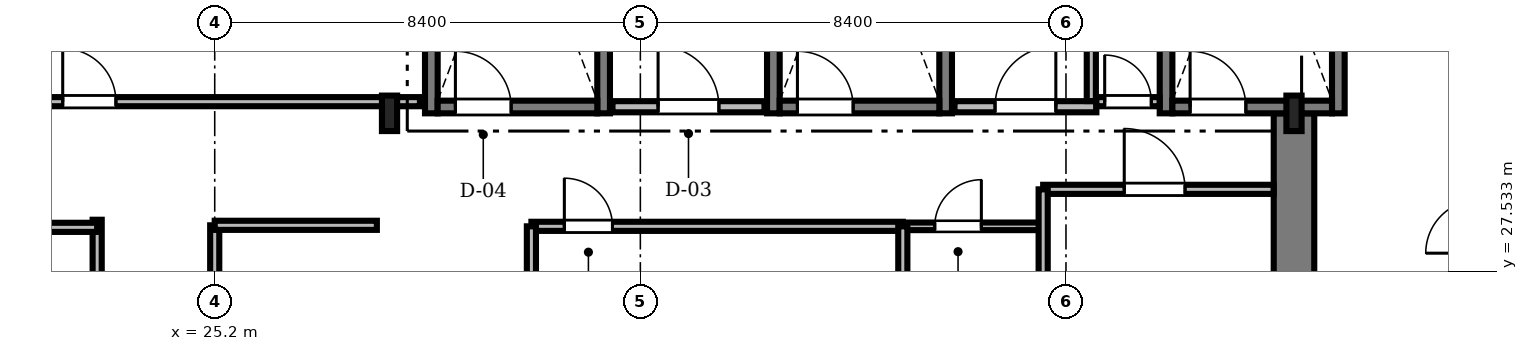
"""IFC4 building model, lengths in metres.
Left out: names, types, materials, properties, quantities, classifications, styles, units other than length and angle.
Written with IfcOpenShell. Run it as: python <this file> out.ifc"""

import sys

from ifc_helpers import new_model, si_unit, direction, frame, frame_2d, origin, origin_2d, place, context, subcontext, project, spatial, rectangle, i_section, extrude, source, transform, mapped, element, fill, save


model = new_model("IFC4")
c1 = context("Model", 3, precision=1e-05, world=origin(), true_north=direction((0.0, 1.0)))
c2 = subcontext(c1, "Body", "Model", "MODEL_VIEW")
j1 = project(units=[si_unit("LENGTHUNIT", "METRE"), si_unit("PLANEANGLEUNIT", "RADIAN")], contexts=[c1])
p1 = place(None, origin())
s1 = spatial("IfcSite", under=j1, at=p1, CompositionType="ELEMENT")
p2 = place(p1, origin())
s2 = spatial("IfcBuilding", under=s1, at=p2, CompositionType="ELEMENT")
p3 = place(p2, frame((0.0, 0.0, 233.55)))
s3 = spatial("IfcBuildingStorey", under=s2, at=p3, CompositionType="ELEMENT", Elevation=233.55)
m1 = source(origin(), c2, "Body", "SweptSolid", [
    extrude(rectangle(XDim=13.15, YDim=0.8, at=frame_2d((6.575, 0.0))), origin(), (0.0, 0.0, 1.0), 3.1),
])
p4 = place(p3, frame((46.5, 17.5, 0.0), z_axis=(0.0, 0.0, 1.0), x_axis=(0.0, 1.0, 0.0)))
e1 = element("IfcWall", 1, at=p4, inside=s3, PredefinedType="SHEAR", context=c2, shape_type="MappedRepresentation", body=[
    mapped(m1, transform((0.0, 0.0, 0.0), scale=1.0)),
])
m2 = source(origin(), c2, "Body", "SweptSolid", [
    extrude(i_section(OverallWidth=0.3, OverallDepth=0.7, WebThickness=0.017, FlangeThickness=0.032, FilletRadius=0.027, at=origin_2d()), origin(), (0.0, 0.0, 1.0), 3.1),
])
for number, where, z_axis, x_axis in (
    (2, (28.65, 30.65, 0.0), (0.0, 0.0, 1.0), (1.0, 0.0, 0.0)),
    (3, (46.5, 30.65, 0.0), (0.0, 0.0, 1.0), (1.0, 0.0, 0.0)),
):
    element("IfcColumn", number, at=place(p3, frame(where, z_axis=z_axis, x_axis=x_axis)), inside=s3, PredefinedType="COLUMN", context=c2, shape_type="MappedRepresentation", body=[
        mapped(m2, transform((0.0, 0.0, 0.0), scale=1.0)),
    ])
m3 = source(origin(), c2, "Body", "SweptSolid", [
    extrude(rectangle(XDim=9.25, YDim=0.25, at=frame_2d((4.625, 0.0))), origin(), (0.0, 0.0, 1.0), 3.55),
])
for number, where, z_axis, x_axis in (
    (4, (29.475, 30.65, 0.0), (0.0, 0.0, 1.0), (0.0, 1.0, 0.0)),
    (5, (32.875, 30.65, 0.0), (0.0, 0.0, 1.0), (0.0, 1.0, 0.0)),
):
    element("IfcWall", number, at=place(p3, frame(where, z_axis=z_axis, x_axis=x_axis)), inside=s3, PredefinedType="SOLIDWALL", context=c2, shape_type="MappedRepresentation", body=[
        mapped(m3, transform((0.0, 0.0, 0.0), scale=1.0)),
    ])
m4 = source(origin(), c2, "Body", "SweptSolid", [
    extrude(rectangle(XDim=3.15, YDim=0.25, at=frame_2d((1.575, 0.0))), origin(), (0.0, 0.0, 1.0), 3.55),
])
p5 = place(p3, frame((29.6, 30.775, 0.0), z_axis=(0.0, 0.0, 1.0), x_axis=(1.0, 0.0, 0.0)))
e6 = element("IfcWall", 6, at=p5, inside=s3, PredefinedType="SOLIDWALL", context=c2, shape_type="MappedRepresentation", body=[
    mapped(m4, transform((0.0, 0.0, 0.0), scale=1.0)),
])
m5 = source(origin(), c2, "Body", "SweptSolid", [
    extrude(rectangle(XDim=1.1, YDim=2.2, at=frame_2d((0.55, 1.1))), frame((0.0, 0.135, 0.0), z_axis=(0.0, -1.0, 0.0), x_axis=(1.0, 0.0, 0.0)), (0.0, 0.0, 1.0), 0.27),
])
p6 = place(p5, frame((0.35, 0.0, 0.0)))
e7 = element("IfcOpeningElement", 7, at=p6, cuts=e6, PredefinedType="OPENING", context=c2, shape_type="MappedRepresentation", body=[
    mapped(m5, transform((0.0, 0.0, 0.0), scale=1.0)),
])
for number, where, z_axis, x_axis in (
    (8, (36.225, 30.65, 0.0), (0.0, 0.0, 1.0), (0.0, 1.0, 0.0)),
    (9, (39.625, 30.65, 0.0), (0.0, 0.0, 1.0), (0.0, 1.0, 0.0)),
):
    element("IfcWall", number, at=place(p3, frame(where, z_axis=z_axis, x_axis=x_axis)), inside=s3, PredefinedType="SOLIDWALL", context=c2, shape_type="MappedRepresentation", body=[
        mapped(m3, transform((0.0, 0.0, 0.0), scale=1.0)),
    ])
p7 = place(p3, frame((36.35, 30.775, 0.0), z_axis=(0.0, 0.0, 1.0), x_axis=(1.0, 0.0, 0.0)))
e10 = element("IfcWall", 10, at=p7, inside=s3, PredefinedType="SOLIDWALL", context=c2, shape_type="MappedRepresentation", body=[
    mapped(m4, transform((0.0, 0.0, 0.0), scale=1.0)),
])
p8 = place(p7, frame((0.35, 0.0, 0.0)))
e11 = element("IfcOpeningElement", 11, at=p8, cuts=e10, PredefinedType="OPENING", context=c2, shape_type="MappedRepresentation", body=[
    mapped(m5, transform((0.0, 0.0, 0.0), scale=1.0)),
])
for number, where, z_axis, x_axis in (
    (12, (43.975, 30.65, 0.0), (0.0, 0.0, 1.0), (0.0, 1.0, 0.0)),
    (13, (47.375, 30.65, 0.0), (0.0, 0.0, 1.0), (0.0, 1.0, 0.0)),
):
    element("IfcWall", number, at=place(p3, frame(where, z_axis=z_axis, x_axis=x_axis)), inside=s3, PredefinedType="SOLIDWALL", context=c2, shape_type="MappedRepresentation", body=[
        mapped(m3, transform((0.0, 0.0, 0.0), scale=1.0)),
    ])
p9 = place(p3, frame((44.1, 30.775, 0.0), z_axis=(0.0, 0.0, 1.0), x_axis=(1.0, 0.0, 0.0)))
e14 = element("IfcWall", 14, at=p9, inside=s3, PredefinedType="SOLIDWALL", context=c2, shape_type="MappedRepresentation", body=[
    mapped(m4, transform((0.0, 0.0, 0.0), scale=1.0)),
])
p10 = place(p9, frame((0.35, 0.0, 0.0)))
e15 = element("IfcOpeningElement", 15, at=p10, cuts=e14, PredefinedType="OPENING", context=c2, shape_type="MappedRepresentation", body=[
    mapped(m5, transform((0.0, 0.0, 0.0), scale=1.0)),
])
m6 = source(origin(), c2, "Body", "SweptSolid", [
    extrude(rectangle(XDim=3.0, YDim=0.22, at=frame_2d((1.5, 0.0))), origin(), (0.0, 0.0, 1.0), 3.1),
])
p11 = place(p3, frame((33.05, 30.78, 0.0), z_axis=(0.0, 0.0, 1.0), x_axis=(1.0, 0.0, 0.0)))
e16 = element("IfcWall", 16, at=p11, inside=s3, PredefinedType="SOLIDWALL", context=c2, shape_type="MappedRepresentation", body=[
    mapped(m6, transform((0.0, 0.0, 0.0), scale=1.0)),
])
m7 = source(origin(), c2, "Body", "SweptSolid", [
    extrude(rectangle(XDim=1.2, YDim=2.2, at=frame_2d((0.6, 1.1))), frame((0.0, 0.12, 0.0), z_axis=(0.0, -1.0, 0.0), x_axis=(1.0, 0.0, 0.0)), (0.0, 0.0, 1.0), 0.24),
])
p12 = place(p11, frame((0.9, 0.0, 0.0)))
e17 = element("IfcOpeningElement", 17, at=p12, cuts=e16, PredefinedType="OPENING", context=c2, shape_type="MappedRepresentation", body=[
    mapped(m7, transform((0.0, 0.0, 0.0), scale=1.0)),
])
m8 = source(origin(), c2, "Body", "SweptSolid", [
    extrude(rectangle(XDim=2.8, YDim=0.22, at=frame_2d((1.4, 0.0))), origin(), (0.0, 0.0, 1.0), 3.1),
])
p13 = place(p3, frame((39.8, 30.78, 0.0), z_axis=(0.0, 0.0, 1.0), x_axis=(1.0, 0.0, 0.0)))
e18 = element("IfcWall", 18, at=p13, inside=s3, PredefinedType="SOLIDWALL", context=c2, shape_type="MappedRepresentation", body=[
    mapped(m8, transform((0.0, 0.0, 0.0), scale=1.0)),
])
p14 = place(p13, frame((0.8, 0.0, 0.0)))
e19 = element("IfcOpeningElement", 19, at=p14, cuts=e18, PredefinedType="OPENING", context=c2, shape_type="MappedRepresentation", body=[
    mapped(m7, transform((0.0, 0.0, 0.0), scale=1.0)),
])
m9 = source(origin(), c2, "Body", "SweptSolid", [
    extrude(rectangle(XDim=17.828, YDim=0.18, at=frame_2d((8.914, 0.0))), origin(), (0.0, 0.0, 1.0), 2.376),
])
p15 = place(p3, frame((11.422, 30.88, 0.0), z_axis=(0.0, 0.0, 1.0), x_axis=(1.0, 0.0, 0.0)))
e20 = element("IfcWall", 20, at=p15, inside=s3, PredefinedType="PARTITIONING", context=c2, shape_type="MappedRepresentation", body=[
    mapped(m9, transform((0.0, 0.0, 0.0), scale=1.0)),
])
m10 = source(origin(), c2, "Body", "SweptSolid", [
    extrude(rectangle(XDim=1.05, YDim=2.2, at=frame_2d((0.525, 1.1))), frame((0.0, 0.1, 0.0), z_axis=(0.0, -1.0, 0.0), x_axis=(1.0, 0.0, 0.0)), (0.0, 0.0, 1.0), 0.2),
])
p16 = place(p15, frame((10.778, 0.0, 0.0)))
e21 = element("IfcOpeningElement", 21, at=p16, cuts=e20, PredefinedType="OPENING", context=c2, shape_type="MappedRepresentation", body=[
    mapped(m10, transform((0.0, 0.0, 0.0), scale=1.0)),
])
m11 = source(origin(), c2, "Body", "SweptSolid", [
    extrude(rectangle(XDim=11.94, YDim=0.18, at=frame_2d((5.97, 0.0))), origin(), (0.0, 0.0, 1.0), 2.542),
])
p17 = place(p3, frame((25.2, 16.5, 0.0), z_axis=(0.0, 0.0, 1.0), x_axis=(0.0, 1.0, 0.0)))
e22 = element("IfcWall", 22, at=p17, inside=s3, PredefinedType="PARTITIONING", context=c2, shape_type="MappedRepresentation", body=[
    mapped(m11, transform((0.0, 0.0, 0.0), scale=1.0)),
])
p18 = place(p17, frame((4.5, 0.0, 0.0)))
e23 = element("IfcOpeningElement", 23, at=p18, cuts=e22, PredefinedType="OPENING", context=c2, shape_type="MappedRepresentation", body=[
    mapped(m10, transform((0.0, 0.0, 0.0), scale=1.0)),
])
m12 = source(origin(), c2, "Body", "SweptSolid", [
    extrude(rectangle(XDim=7.33, YDim=0.18, at=frame_2d((3.665, 0.0))), origin(), (0.0, 0.0, 1.0), 2.732),
])
p19 = place(p3, frame((31.45, 28.42, 0.0), z_axis=(0.0, 0.0, 1.0), x_axis=(1.0, 0.0, 0.0)))
e24 = element("IfcWall", 24, at=p19, inside=s3, PredefinedType="PARTITIONING", context=c2, shape_type="MappedRepresentation", body=[
    mapped(m12, transform((0.0, 0.0, 0.0), scale=1.0)),
])
m13 = source(origin(), c2, "Body", "SweptSolid", [
    extrude(rectangle(XDim=0.95, YDim=2.15, at=frame_2d((0.475, 1.075))), frame((0.0, 0.1, 0.0), z_axis=(0.0, -1.0, 0.0), x_axis=(1.0, 0.0, 0.0)), (0.0, 0.0, 1.0), 0.2),
])
p20 = place(p19, frame((0.65, 0.0, 0.0)))
e25 = element("IfcOpeningElement", 25, at=p20, cuts=e24, PredefinedType="OPENING", context=c2, shape_type="MappedRepresentation", body=[
    mapped(m13, transform((0.0, 0.0, 0.0), scale=1.0)),
])
m14 = source(origin(), c2, "Body", "SweptSolid", [
    extrude(rectangle(XDim=4.548, YDim=0.18, at=frame_2d((2.274, 0.0))), origin(), (0.0, 0.0, 1.0), 2.732),
])
p21 = place(p3, frame((41.55, 29.15, 0.0), z_axis=(0.0, 0.0, 1.0), x_axis=(1.0, 0.0, 0.0)))
e26 = element("IfcWall", 26, at=p21, inside=s3, PredefinedType="PARTITIONING", context=c2, shape_type="MappedRepresentation", body=[
    mapped(m14, transform((0.0, 0.0, 0.0), scale=1.0)),
])
m15 = source(origin(), c2, "Body", "SweptSolid", [
    extrude(rectangle(XDim=1.2, YDim=2.2, at=frame_2d((0.6, 1.1))), frame((0.0, 0.1, 0.0), z_axis=(0.0, -1.0, 0.0), x_axis=(1.0, 0.0, 0.0)), (0.0, 0.0, 1.0), 0.2),
])
p22 = place(p21, frame((1.6, 0.0, 0.0)))
e27 = element("IfcOpeningElement", 27, at=p22, cuts=e26, PredefinedType="OPENING", context=c2, shape_type="MappedRepresentation", body=[
    mapped(m15, transform((0.0, 0.0, 0.0), scale=1.0)),
])
m16 = source(origin(), c2, "Body", "SweptSolid", [
    extrude(rectangle(XDim=2.74, YDim=0.15, at=frame_2d((1.37, 0.0))), origin(), (0.0, 0.0, 1.0), 3.1),
])
p23 = place(p3, frame((38.78, 28.42, 0.0), z_axis=(0.0, 0.0, 1.0), x_axis=(1.0, 0.0, 0.0)))
e28 = element("IfcWall", 28, at=p23, inside=s3, PredefinedType="PARTITIONING", context=c2, shape_type="MappedRepresentation", body=[
    mapped(m16, transform((0.0, 0.0, 0.0), scale=1.0)),
])
m17 = source(origin(), c2, "Body", "SweptSolid", [
    extrude(rectangle(XDim=0.92, YDim=2.1, at=frame_2d((0.46, 1.05))), frame((0.0, 0.085, 0.0), z_axis=(0.0, -1.0, 0.0), x_axis=(1.0, 0.0, 0.0)), (0.0, 0.0, 1.0), 0.17),
])
p24 = place(p23, frame((0.63, 0.0, 0.0)))
e29 = element("IfcOpeningElement", 29, at=p24, cuts=e28, PredefinedType="OPENING", context=c2, shape_type="MappedRepresentation", body=[
    mapped(m17, transform((0.0, 0.0, 0.0), scale=1.0)),
])
m18 = source(origin(), c2, "Body", "SweptSolid", [
    extrude(rectangle(XDim=1.248, YDim=0.18, at=frame_2d((0.624, 0.0))), origin(), (0.0, 0.0, 1.0), 3.1),
])
p25 = place(p3, frame((42.6, 30.88, 0.0), z_axis=(0.0, 0.0, 1.0), x_axis=(1.0, 0.0, 0.0)))
e30 = element("IfcWall", 30, at=p25, inside=s3, PredefinedType="PARTITIONING", context=c2, shape_type="MappedRepresentation", body=[
    mapped(m18, transform((0.0, 0.0, 0.0), scale=1.0)),
])
m19 = source(origin(), c2, "Body", "SweptSolid", [
    extrude(rectangle(XDim=0.92, YDim=2.1, at=frame_2d((0.46, 1.05))), frame((0.0, 0.1, 0.0), z_axis=(0.0, -1.0, 0.0), x_axis=(1.0, 0.0, 0.0)), (0.0, 0.0, 1.0), 0.2),
])
p26 = place(p25, frame((0.164, 0.0, 0.0)))
e31 = element("IfcOpeningElement", 31, at=p26, cuts=e30, PredefinedType="OPENING", context=c2, shape_type="MappedRepresentation", body=[
    mapped(m19, transform((0.0, 0.0, 0.0), scale=1.0)),
])
m20 = source(origin(), c2, "Body", "SweptSolid", [
    extrude(rectangle(XDim=14.98, YDim=0.18, at=frame_2d((7.49, 0.0))), origin(), (0.0, 0.0, 1.0), 2.542),
])
p27 = place(p3, frame((22.88, 13.57, 0.0), z_axis=(0.0, 0.0, 1.0), x_axis=(0.0, 1.0, 0.0)))
e32 = element("IfcWall", 32, at=p27, inside=s3, PredefinedType="PARTITIONING", context=c2, shape_type="MappedRepresentation", body=[
    mapped(m20, transform((0.0, 0.0, 0.0), scale=1.0)),
])
m21 = source(origin(), c2, "Body", "SweptSolid", [
    extrude(rectangle(XDim=11.65, YDim=0.18, at=frame_2d((5.825, 0.0))), origin(), (0.0, 0.0, 1.0), 2.376),
])
p28 = place(p3, frame((11.23, 28.4, 0.0), z_axis=(0.0, 0.0, 1.0), x_axis=(1.0, 0.0, 0.0)))
e33 = element("IfcWall", 33, at=p28, inside=s3, PredefinedType="PARTITIONING", context=c2, shape_type="MappedRepresentation", body=[
    mapped(m21, transform((0.0, 0.0, 0.0), scale=1.0)),
])
m22 = source(origin(), c2, "Body", "SweptSolid", [
    extrude(rectangle(XDim=3.2, YDim=0.18, at=frame_2d((1.6, 0.0))), origin(), (0.0, 0.0, 1.0), 3.1),
])
p29 = place(p3, frame((25.2, 28.44, 0.0), z_axis=(0.0, 0.0, 1.0), x_axis=(1.0, 0.0, 0.0)))
e34 = element("IfcWall", 34, at=p29, inside=s3, PredefinedType="PARTITIONING", context=c2, shape_type="MappedRepresentation", body=[
    mapped(m22, transform((0.0, 0.0, 0.0), scale=1.0)),
])
m23 = source(origin(), c2, "Body", "SweptSolid", [
    extrude(rectangle(XDim=2.758, YDim=0.18, at=frame_2d((1.379, 0.0))), origin(), (0.0, 0.0, 1.0), 3.1),
])
p30 = place(p3, frame((42.5, 30.892, 0.0), z_axis=(0.0, 0.0, 1.0), x_axis=(0.0, 1.0, 0.0)))
e35 = element("IfcWall", 35, at=p30, inside=s3, PredefinedType="PARTITIONING", context=c2, shape_type="MappedRepresentation", body=[
    mapped(m23, transform((0.0, 0.0, 0.0), scale=1.0)),
])
m24 = source(origin(), c2, "Body", "SweptSolid", [
    extrude(rectangle(XDim=2.35, YDim=0.18, at=frame_2d((1.175, 0.0))), origin(), (0.0, 0.0, 1.0), 2.542),
])
p31 = place(p3, frame((41.55, 26.8, 0.0), z_axis=(0.0, 0.0, 1.0), x_axis=(0.0, 1.0, 0.0)))
e36 = element("IfcWall", 36, at=p31, inside=s3, PredefinedType="PARTITIONING", context=c2, shape_type="MappedRepresentation", body=[
    mapped(m24, transform((0.0, 0.0, 0.0), scale=1.0)),
])
m25 = source(origin(), c2, "Body", "SweptSolid", [
    extrude(rectangle(XDim=1.6, YDim=0.18, at=frame_2d((0.8, 0.0))), origin(), (0.0, 0.0, 1.0), 2.642),
])
for number, where, z_axis, x_axis in (
    (37, (31.45, 26.82, 0.0), (0.0, 0.0, 1.0), (0.0, 1.0, 0.0)),
    (38, (38.78, 26.82, 0.0), (0.0, 0.0, 1.0), (0.0, 1.0, 0.0)),
):
    element("IfcWall", number, at=place(p3, frame(where, z_axis=z_axis, x_axis=x_axis)), inside=s3, PredefinedType="PARTITIONING", context=c2, shape_type="MappedRepresentation", body=[
        mapped(m25, transform((0.0, 0.0, 0.0), scale=1.0)),
    ])
m26 = source(origin(), c2, "Body", "SweptSolid", [
    extrude(rectangle(XDim=1.1, YDim=2.2, at=frame_2d((0.55, 1.1))), frame((0.0, 0.025, 0.0), z_axis=(0.0, -1.0, 0.0), x_axis=(1.0, 0.0, 0.0)), (0.0, 0.0, 1.0), 0.05),
])
p32 = place(p6, origin())
e39 = element("IfcDoor", 39, at=p32, inside=s3, OperationType="SINGLE_SWING_LEFT", PredefinedType="DOOR", context=c2, shape_type="MappedRepresentation", body=[
    mapped(m26, transform((0.0, 0.0, 0.0), scale=1.0)),
])
fill(e7, e39)
p33 = place(p8, origin())
e40 = element("IfcDoor", 40, at=p33, inside=s3, OperationType="SINGLE_SWING_LEFT", PredefinedType="DOOR", context=c2, shape_type="MappedRepresentation", body=[
    mapped(m26, transform((0.0, 0.0, 0.0), scale=1.0)),
])
fill(e11, e40)
p34 = place(p10, origin())
e41 = element("IfcDoor", 41, at=p34, inside=s3, OperationType="SINGLE_SWING_LEFT", PredefinedType="DOOR", context=c2, shape_type="MappedRepresentation", body=[
    mapped(m26, transform((0.0, 0.0, 0.0), scale=1.0)),
])
fill(e15, e41)
m27 = source(origin(), c2, "Body", "SweptSolid", [
    extrude(rectangle(XDim=1.2, YDim=2.2, at=frame_2d((0.6, 1.1))), frame((0.0, 0.025, 0.0), z_axis=(0.0, -1.0, 0.0), x_axis=(1.0, 0.0, 0.0)), (0.0, 0.0, 1.0), 0.05),
])
p35 = place(p12, origin())
e42 = element("IfcDoor", 42, at=p35, inside=s3, OperationType="SINGLE_SWING_LEFT", PredefinedType="DOOR", context=c2, shape_type="MappedRepresentation", body=[
    mapped(m27, transform((0.0, 0.0, 0.0), scale=1.0)),
])
fill(e17, e42)
p36 = place(p14, origin())
e43 = element("IfcDoor", 43, at=p36, inside=s3, OperationType="SINGLE_SWING_RIGHT", PredefinedType="DOOR", context=c2, shape_type="MappedRepresentation", body=[
    mapped(m27, transform((0.0, 0.0, 0.0), scale=1.0)),
])
fill(e19, e43)
m28 = source(origin(), c2, "Body", "SweptSolid", [
    extrude(rectangle(XDim=1.05, YDim=2.2, at=frame_2d((0.525, 1.1))), frame((0.0, 0.025, 0.0), z_axis=(0.0, -1.0, 0.0), x_axis=(1.0, 0.0, 0.0)), (0.0, 0.0, 1.0), 0.05),
])
p37 = place(p16, origin())
e44 = element("IfcDoor", 44, at=p37, inside=s3, OperationType="SINGLE_SWING_LEFT", PredefinedType="DOOR", context=c2, shape_type="MappedRepresentation", body=[
    mapped(m28, transform((0.0, 0.0, 0.0), scale=1.0)),
])
fill(e21, e44)
m29 = source(origin(), c2, "Body", "SweptSolid", [
    extrude(rectangle(XDim=0.95, YDim=2.15, at=frame_2d((0.475, 1.075))), frame((0.0, 0.025, 0.0), z_axis=(0.0, -1.0, 0.0), x_axis=(1.0, 0.0, 0.0)), (0.0, 0.0, 1.0), 0.05),
])
p38 = place(p20, origin())
e45 = element("IfcDoor", 45, at=p38, inside=s3, OperationType="SINGLE_SWING_LEFT", PredefinedType="DOOR", context=c2, shape_type="MappedRepresentation", body=[
    mapped(m29, transform((0.0, 0.0, 0.0), scale=1.0)),
])
fill(e25, e45)
p39 = place(p22, origin())
e46 = element("IfcDoor", 46, at=p39, inside=s3, OperationType="SINGLE_SWING_LEFT", PredefinedType="DOOR", context=c2, shape_type="MappedRepresentation", body=[
    mapped(m27, transform((0.0, 0.0, 0.0), scale=1.0)),
])
fill(e27, e46)
m30 = source(origin(), c2, "Body", "SweptSolid", [
    extrude(rectangle(XDim=0.92, YDim=2.1, at=frame_2d((0.46, 1.05))), frame((0.0, 0.025, 0.0), z_axis=(0.0, -1.0, 0.0), x_axis=(1.0, 0.0, 0.0)), (0.0, 0.0, 1.0), 0.05),
])
p40 = place(p24, origin())
e47 = element("IfcDoor", 47, at=p40, inside=s3, OperationType="SINGLE_SWING_RIGHT", PredefinedType="DOOR", context=c2, shape_type="MappedRepresentation", body=[
    mapped(m30, transform((0.0, 0.0, 0.0), scale=1.0)),
])
fill(e29, e47)
p41 = place(p26, origin())
e48 = element("IfcDoor", 48, at=p41, inside=s3, OperationType="SINGLE_SWING_LEFT", PredefinedType="DOOR", context=c2, shape_type="MappedRepresentation", body=[
    mapped(m30, transform((0.0, 0.0, 0.0), scale=1.0)),
])
fill(e31, e48)
save(model, sys.argv[1])
